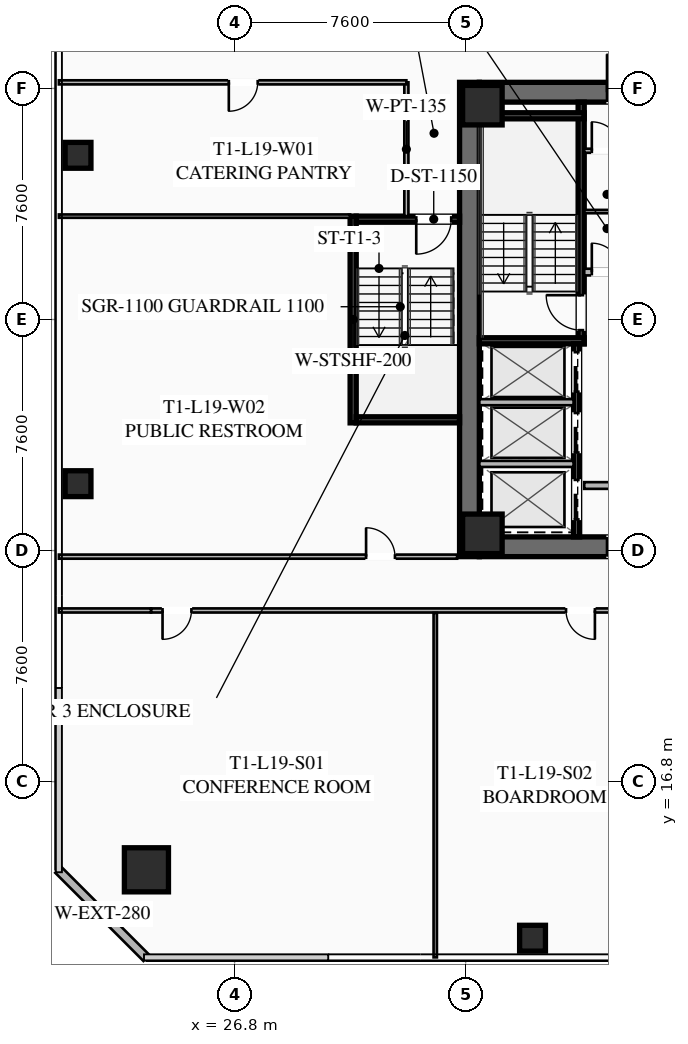
"""IFC4 building model, lengths in metres.
Left out: names, types, materials, properties, quantities, classifications, styles, units other than length and angle.
Written with IfcOpenShell. Run it as: python <this file> out.ifc"""

import sys

from ifc_helpers import new_model, si_unit, direction, frame, frame_2d, origin, origin_2d, place, context, subcontext, project, spatial, rectangle, hollow_rectangle, extrude, element, fill, save


model = new_model("IFC4")
c1 = context("Model", 3, precision=1e-05, world=origin(), true_north=direction((0.0, 1.0)))
c2 = subcontext(c1, "Body", "Model", "MODEL_VIEW")
j1 = project(units=[si_unit("LENGTHUNIT", "METRE"), si_unit("PLANEANGLEUNIT", "RADIAN")], contexts=[c1])
p1 = place(None, origin())
s1 = spatial("IfcSite", under=j1, at=p1, CompositionType="ELEMENT")
p2 = place(p1, origin())
s2 = spatial("IfcBuilding", under=s1, at=p2, CompositionType="ELEMENT")
p3 = place(p2, frame((0.0, 0.0, 74.3)))
s3 = spatial("IfcBuildingStorey", under=s2, at=p3, CompositionType="ELEMENT", Elevation=74.3)
p4 = place(p3, frame((34.525, 24.2, 0.0), z_axis=(0.0, 0.0, 1.0), x_axis=(0.0, 1.0, 0.0)))
e1 = element("IfcWall", 1, at=p4, inside=s3, PredefinedType="SHEAR", context=c2, shape_type="SweptSolid", body=[
    extrude(rectangle(XDim=15.6, YDim=0.65, at=frame_2d((7.8, 0.0))), origin(), (0.0, 0.0, 1.0), 3.55),
])
p5 = place(p3, frame((49.15, 24.525, 0.0), z_axis=(0.0, 0.0, 1.0), x_axis=(-1.0, 0.0, 0.0)))
e2 = element("IfcWall", 2, at=p5, inside=s3, PredefinedType="SHEAR", context=c2, shape_type="SweptSolid", body=[
    extrude(rectangle(XDim=14.3, YDim=0.65, at=frame_2d((7.15, 0.0))), origin(), (0.0, 0.0, 1.0), 3.55),
])
p6 = place(p5, frame((8.85, 0.0, 0.0)))
e3 = element("IfcOpeningElement", 3, at=p6, cuts=e2, PredefinedType="OPENING", context=c2, shape_type="SweptSolid", body=[
    extrude(rectangle(XDim=1.25, YDim=2.25, at=frame_2d((0.625, 1.125))), frame((0.0, 0.335, 0.0), z_axis=(0.0, -1.0, 0.0), x_axis=(1.0, 0.0, 0.0)), (0.0, 0.0, 1.0), 0.67),
])
p7 = place(p5, frame((3.8, 0.0, 0.0)))
e4 = element("IfcOpeningElement", 4, at=p7, cuts=e2, PredefinedType="OPENING", context=c2, shape_type="SweptSolid", body=[
    extrude(rectangle(XDim=1.25, YDim=2.25, at=frame_2d((0.625, 1.125))), frame((0.0, 0.335, 0.0), z_axis=(0.0, -1.0, 0.0), x_axis=(1.0, 0.0, 0.0)), (0.0, 0.0, 1.0), 0.67),
])
p8 = place(p3, frame((34.85, 39.475, 0.0), z_axis=(0.0, 0.0, 1.0), x_axis=(1.0, 0.0, 0.0)))
e5 = element("IfcWall", 5, at=p8, inside=s3, PredefinedType="SHEAR", context=c2, shape_type="SweptSolid", body=[
    extrude(rectangle(XDim=14.3, YDim=0.65, at=frame_2d((7.15, 0.0))), origin(), (0.0, 0.0, 1.0), 3.55),
])
p9 = place(p8, frame((4.2, 0.0, 0.0)))
e6 = element("IfcOpeningElement", 6, at=p9, cuts=e5, PredefinedType="OPENING", context=c2, shape_type="SweptSolid", body=[
    extrude(rectangle(XDim=1.25, YDim=2.25, at=frame_2d((0.625, 1.125))), frame((0.0, 0.335, 0.0), z_axis=(0.0, -1.0, 0.0), x_axis=(1.0, 0.0, 0.0)), (0.0, 0.0, 1.0), 0.67),
])
p10 = place(p8, frame((9.25, 0.0, 0.0)))
e7 = element("IfcOpeningElement", 7, at=p10, cuts=e5, PredefinedType="OPENING", context=c2, shape_type="SweptSolid", body=[
    extrude(rectangle(XDim=1.25, YDim=2.25, at=frame_2d((0.625, 1.125))), frame((0.0, 0.335, 0.0), z_axis=(0.0, -1.0, 0.0), x_axis=(1.0, 0.0, 0.0)), (0.0, 0.0, 1.0), 0.67),
])
for number, where, z_axis, x_axis in (
    (8, (34.95, 24.95, 0.0), (0.0, 0.0, 1.0), (1.0, 0.0, 0.0)),
    (9, (34.95, 39.05, 0.0), (0.0, 0.0, 1.0), (1.0, 0.0, 0.0)),
):
    element("IfcColumn", number, at=place(p3, frame(where, z_axis=z_axis, x_axis=x_axis)), inside=s3, PredefinedType="COLUMN", context=c2, shape_type="SweptSolid", body=[
        extrude(hollow_rectangle(XDim=1.3, YDim=1.3, WallThickness=0.05, at=origin_2d()), origin(), (0.0, 0.0, 1.0), 3.35),
    ])
p11 = place(p3, frame((23.9, 13.9, 0.0), z_axis=(0.0, 0.0, 1.0), x_axis=(1.0, 0.0, 0.0)))
e10 = element("IfcColumn", 10, at=p11, inside=s3, PredefinedType="COLUMN", context=c2, shape_type="SweptSolid", body=[
    extrude(hollow_rectangle(XDim=1.45, YDim=1.45, WallThickness=0.055, at=origin_2d()), origin(), (0.0, 0.0, 1.0), 3.35),
])
for number, where, z_axis, x_axis in (
    (11, (36.6, 11.65, 0.0), (0.0, 0.0, 1.0), (1.0, 0.0, 0.0)),
    (12, (21.65, 37.4, 0.0), (0.0, 0.0, 1.0), (1.0, 0.0, 0.0)),
    (13, (21.65, 26.6, 0.0), (0.0, 0.0, 1.0), (1.0, 0.0, 0.0)),
):
    element("IfcColumn", number, at=place(p3, frame(where, z_axis=z_axis, x_axis=x_axis)), inside=s3, PredefinedType="COLUMN", context=c2, shape_type="SweptSolid", body=[
        extrude(hollow_rectangle(XDim=0.85, YDim=0.85, WallThickness=0.035, at=origin_2d()), origin(), (0.0, 0.0, 1.0), 3.35),
    ])
p12 = place(p3, frame((23.9, 11.0, 0.0), z_axis=(0.0, 0.0, 1.0), x_axis=(-0.707106781187, 0.707106781187, 0.0)))
e14 = element("IfcWall", 14, at=p12, inside=s3, PredefinedType="SOLIDWALL", context=c2, shape_type="SweptSolid", body=[
    extrude(rectangle(XDim=4.101, YDim=0.28, at=frame_2d((2.051, 0.0))), origin(), (0.0, 0.0, 1.0), 3.35),
])
p13 = place(p3, frame((38.2, 31.2, 0.0), z_axis=(0.0, 0.0, 1.0), x_axis=(0.0, 1.0, 0.0)))
e15 = element("IfcWall", 15, at=p13, inside=s3, PredefinedType="SHEAR", context=c2, shape_type="SweptSolid", body=[
    extrude(rectangle(XDim=7.95, YDim=0.2, at=frame_2d((3.975, 0.0))), origin(), (0.0, 0.0, 1.0), 3.35),
])
p14 = place(p13, frame((0.45, 0.0, 0.0)))
e16 = element("IfcOpeningElement", 16, at=p14, cuts=e15, PredefinedType="OPENING", context=c2, shape_type="SweptSolid", body=[
    extrude(rectangle(XDim=1.15, YDim=2.2, at=frame_2d((0.575, 1.1))), frame((0.0, 0.11, 0.0), z_axis=(0.0, -1.0, 0.0), x_axis=(1.0, 0.0, 0.0)), (0.0, 0.0, 1.0), 0.22),
])
for number, where, z_axis, x_axis in (
    (17, (34.85, 31.3, 0.0), (0.0, 0.0, 1.0), (1.0, 0.0, 0.0)),
    (18, (34.85, 38.7, 0.0), (0.0, 0.0, 1.0), (1.0, 0.0, 0.0)),
):
    element("IfcWall", number, at=place(p3, frame(where, z_axis=z_axis, x_axis=x_axis)), inside=s3, PredefinedType="SHEAR", context=c2, shape_type="SweptSolid", body=[
        extrude(rectangle(XDim=3.45, YDim=0.2, at=frame_2d((1.725, 0.0))), origin(), (0.0, 0.0, 1.0), 3.35),
    ])
p15 = place(p3, frame((38.3, 33.56, 0.0), z_axis=(0.0, 0.0, 1.0), x_axis=(1.0, 0.0, 0.0)))
e19 = element("IfcWall", 19, at=p15, inside=s3, PredefinedType="SOLIDWALL", context=c2, shape_type="SweptSolid", body=[
    extrude(rectangle(XDim=3.15, YDim=0.22, at=frame_2d((1.575, 0.0))), origin(), (0.0, 0.0, 1.0), 2.703),
])
p16 = place(p15, frame((0.25, 0.0, 0.0)))
e20 = element("IfcOpeningElement", 20, at=p16, cuts=e19, PredefinedType="OPENING", context=c2, shape_type="SweptSolid", body=[
    extrude(rectangle(XDim=0.95, YDim=2.05, at=frame_2d((0.475, 1.025))), frame((0.0, 0.12, 0.0), z_axis=(0.0, -1.0, 0.0), x_axis=(1.0, 0.0, 0.0)), (0.0, 0.0, 1.0), 0.24),
])
p17 = place(p15, frame((1.95, 0.0, 0.0)))
e21 = element("IfcOpeningElement", 21, at=p17, cuts=e19, PredefinedType="OPENING", context=c2, shape_type="SweptSolid", body=[
    extrude(rectangle(XDim=0.95, YDim=2.05, at=frame_2d((0.475, 1.025))), frame((0.0, 0.12, 0.0), z_axis=(0.0, -1.0, 0.0), x_axis=(1.0, 0.0, 0.0)), (0.0, 0.0, 1.0), 0.24),
])
p18 = place(p3, frame((38.3, 26.54, 0.0), z_axis=(0.0, 0.0, 1.0), x_axis=(1.0, 0.0, 0.0)))
e22 = element("IfcWall", 22, at=p18, inside=s3, PredefinedType="SOLIDWALL", context=c2, shape_type="SweptSolid", body=[
    extrude(rectangle(XDim=3.15, YDim=0.22, at=frame_2d((1.575, 0.0))), origin(), (0.0, 0.0, 1.0), 2.703),
])
p19 = place(p18, frame((0.95, 0.0, 0.0)))
e23 = element("IfcOpeningElement", 23, at=p19, cuts=e22, PredefinedType="OPENING", context=c2, shape_type="SweptSolid", body=[
    extrude(rectangle(XDim=1.25, YDim=2.25, at=frame_2d((0.625, 1.125))), frame((0.0, 0.12, 0.0), z_axis=(0.0, -1.0, 0.0), x_axis=(1.0, 0.0, 0.0)), (0.0, 0.0, 1.0), 0.24),
])
p20 = place(p3, frame((38.05, 24.85, 0.0), z_axis=(0.0, 0.0, 1.0), x_axis=(0.0, 1.0, 0.0)))
e24 = element("IfcWall", 24, at=p20, inside=s3, PredefinedType="SHEAR", context=c2, shape_type="SweptSolid", body=[
    extrude(rectangle(XDim=6.35, YDim=0.2, at=frame_2d((3.175, 0.0))), origin(), (0.0, 0.0, 1.0), 3.35),
])
p21 = place(p20, frame((4.775, 0.0, 0.0)))
e25 = element("IfcOpeningElement", 25, at=p21, cuts=e24, PredefinedType="OPENING", context=c2, shape_type="SweptSolid", body=[
    extrude(rectangle(XDim=1.3, YDim=2.25, at=frame_2d((0.65, 1.125))), frame((0.0, 0.11, 0.0), z_axis=(0.0, -1.0, 0.0), x_axis=(1.0, 0.0, 0.0)), (0.0, 0.0, 1.0), 0.22),
])
p22 = place(p20, frame((2.775, 0.0, 0.0)))
e26 = element("IfcOpeningElement", 26, at=p22, cuts=e24, PredefinedType="OPENING", context=c2, shape_type="SweptSolid", body=[
    extrude(rectangle(XDim=1.3, YDim=2.25, at=frame_2d((0.65, 1.125))), frame((0.0, 0.11, 0.0), z_axis=(0.0, -1.0, 0.0), x_axis=(1.0, 0.0, 0.0)), (0.0, 0.0, 1.0), 0.22),
])
p23 = place(p20, frame((0.575, 0.0, 0.0)))
e27 = element("IfcOpeningElement", 27, at=p23, cuts=e24, PredefinedType="OPENING", context=c2, shape_type="SweptSolid", body=[
    extrude(rectangle(XDim=1.3, YDim=2.25, at=frame_2d((0.65, 1.125))), frame((0.0, 0.11, 0.0), z_axis=(0.0, -1.0, 0.0), x_axis=(1.0, 0.0, 0.0)), (0.0, 0.0, 1.0), 0.22),
])
for number, where, z_axis, x_axis in (
    (28, (34.85, 27.25, 0.0), (0.0, 0.0, 1.0), (1.0, 0.0, 0.0)),
    (29, (34.85, 29.28, 0.0), (0.0, 0.0, 1.0), (1.0, 0.0, 0.0)),
):
    element("IfcWall", number, at=place(p3, frame(where, z_axis=z_axis, x_axis=x_axis)), inside=s3, PredefinedType="SOLIDWALL", context=c2, shape_type="SweptSolid", body=[
        extrude(rectangle(XDim=3.1, YDim=0.2, at=frame_2d((1.55, 0.0))), origin(), (0.0, 0.0, 1.0), 3.35),
    ])
p24 = place(p3, frame((38.3, 37.55, 0.0), z_axis=(0.0, 0.0, 1.0), x_axis=(1.0, 0.0, 0.0)))
e30 = element("IfcWall", 30, at=p24, inside=s3, PredefinedType="PARTITIONING", context=c2, shape_type="SweptSolid", body=[
    extrude(rectangle(XDim=3.15, YDim=0.135, at=frame_2d((1.575, 0.0))), origin(), (0.0, 0.0, 1.0), 2.703),
])
p25 = place(p24, frame((0.25, 0.0, 0.0)))
e31 = element("IfcOpeningElement", 31, at=p25, cuts=e30, PredefinedType="OPENING", context=c2, shape_type="SweptSolid", body=[
    extrude(rectangle(XDim=0.95, YDim=2.05, at=frame_2d((0.475, 1.025))), frame((0.0, 0.077, 0.0), z_axis=(0.0, -1.0, 0.0), x_axis=(1.0, 0.0, 0.0)), (0.0, 0.0, 1.0), 0.155),
])
p26 = place(p24, frame((1.95, 0.0, 0.0)))
e32 = element("IfcOpeningElement", 32, at=p26, cuts=e30, PredefinedType="OPENING", context=c2, shape_type="SweptSolid", body=[
    extrude(rectangle(XDim=0.95, YDim=2.05, at=frame_2d((0.475, 1.025))), frame((0.0, 0.077, 0.0), z_axis=(0.0, -1.0, 0.0), x_axis=(1.0, 0.0, 0.0)), (0.0, 0.0, 1.0), 0.155),
])
p27 = place(p3, frame((38.3, 35.55, 0.0), z_axis=(0.0, 0.0, 1.0), x_axis=(1.0, 0.0, 0.0)))
e33 = element("IfcWall", 33, at=p27, inside=s3, PredefinedType="PARTITIONING", context=c2, shape_type="SweptSolid", body=[
    extrude(rectangle(XDim=3.15, YDim=0.11, at=frame_2d((1.575, 0.0))), origin(), (0.0, 0.0, 1.0), 2.703),
])
p28 = place(p3, frame((30.7, 28.6, 0.0), z_axis=(0.0, 0.0, 1.0), x_axis=(0.0, 1.0, 0.0)))
e34 = element("IfcWall", 34, at=p28, inside=s3, PredefinedType="SHEAR", context=c2, shape_type="SweptSolid", body=[
    extrude(rectangle(XDim=6.8, YDim=0.2, at=frame_2d((3.4, 0.0))), origin(), (0.0, 0.0, 1.0), 3.35),
])
p29 = place(p3, frame((34.2, 35.3, 0.0), z_axis=(0.0, 0.0, 1.0), x_axis=(-1.0, 0.0, 0.0)))
e35 = element("IfcWall", 35, at=p29, inside=s3, PredefinedType="SHEAR", context=c2, shape_type="SweptSolid", body=[
    extrude(rectangle(XDim=3.4, YDim=0.2, at=frame_2d((1.7, 0.0))), origin(), (0.0, 0.0, 1.0), 3.35),
])
p30 = place(p29, frame((0.275, 0.0, 0.0)))
e36 = element("IfcOpeningElement", 36, at=p30, cuts=e35, PredefinedType="OPENING", context=c2, shape_type="SweptSolid", body=[
    extrude(rectangle(XDim=1.15, YDim=2.2, at=frame_2d((0.575, 1.1))), frame((0.0, 0.11, 0.0), z_axis=(0.0, -1.0, 0.0), x_axis=(1.0, 0.0, 0.0)), (0.0, 0.0, 1.0), 0.22),
])
p31 = place(p3, frame((30.8, 28.7, 0.0), z_axis=(0.0, 0.0, 1.0), x_axis=(1.0, 0.0, 0.0)))
e37 = element("IfcWall", 37, at=p31, inside=s3, PredefinedType="SHEAR", context=c2, shape_type="SweptSolid", body=[
    extrude(rectangle(XDim=3.4, YDim=0.2, at=frame_2d((1.7, 0.0))), origin(), (0.0, 0.0, 1.0), 3.35),
])
p32 = place(p3, frame((32.45, 35.4, 0.0), z_axis=(0.0, 0.0, 1.0), x_axis=(0.0, 1.0, 0.0)))
e38 = element("IfcWall", 38, at=p32, inside=s3, PredefinedType="PARTITIONING", context=c2, shape_type="SweptSolid", body=[
    extrude(rectangle(XDim=4.4, YDim=0.135, at=frame_2d((2.2, 0.0))), origin(), (0.0, 0.0, 1.0), 2.703),
])
p33 = place(p3, frame((51.35, 22.43, 0.0), z_axis=(0.0, 0.0, 1.0), x_axis=(-1.0, 0.0, 0.0)))
e39 = element("IfcWall", 39, at=p33, inside=s3, PredefinedType="PARTITIONING", context=c2, shape_type="SweptSolid", body=[
    extrude(rectangle(XDim=27.3, YDim=0.135, at=frame_2d((13.65, 0.0))), origin(), (0.0, 0.0, 1.0), 2.703),
])
p34 = place(p33, frame((25.97, 0.0, 0.0)))
e40 = element("IfcOpeningElement", 40, at=p34, cuts=e39, PredefinedType="OPENING", context=c2, shape_type="SweptSolid", body=[
    extrude(rectangle(XDim=0.95, YDim=2.05, at=frame_2d((0.475, 1.025))), frame((0.0, 0.077, 0.0), z_axis=(0.0, -1.0, 0.0), x_axis=(1.0, 0.0, 0.0)), (0.0, 0.0, 1.0), 0.155),
])
p35 = place(p33, frame((12.698, 0.0, 0.0)))
e41 = element("IfcOpeningElement", 41, at=p35, cuts=e39, PredefinedType="OPENING", context=c2, shape_type="SweptSolid", body=[
    extrude(rectangle(XDim=0.95, YDim=2.05, at=frame_2d((0.475, 1.025))), frame((0.0, 0.077, 0.0), z_axis=(0.0, -1.0, 0.0), x_axis=(1.0, 0.0, 0.0)), (0.0, 0.0, 1.0), 0.155),
])
p36 = place(p33, frame((8.639, 0.0, 0.0)))
e42 = element("IfcOpeningElement", 42, at=p36, cuts=e39, PredefinedType="OPENING", context=c2, shape_type="SweptSolid", body=[
    extrude(rectangle(XDim=0.95, YDim=2.05, at=frame_2d((0.475, 1.025))), frame((0.0, 0.077, 0.0), z_axis=(0.0, -1.0, 0.0), x_axis=(1.0, 0.0, 0.0)), (0.0, 0.0, 1.0), 0.155),
])
p37 = place(p33, frame((0.38, 0.0, 0.0)))
e43 = element("IfcOpeningElement", 43, at=p37, cuts=e39, PredefinedType="OPENING", context=c2, shape_type="SweptSolid", body=[
    extrude(rectangle(XDim=0.95, YDim=2.05, at=frame_2d((0.475, 1.025))), frame((0.0, 0.077, 0.0), z_axis=(0.0, -1.0, 0.0), x_axis=(1.0, 0.0, 0.0)), (0.0, 0.0, 1.0), 0.155),
])
p38 = place(p3, frame((21.02, 22.43, 0.0), z_axis=(0.0, 0.0, 1.0), x_axis=(1.0, 0.0, 0.0)))
e44 = element("IfcWall", 44, at=p38, inside=s3, PredefinedType="PARTITIONING", context=c2, shape_type="SweptSolid", body=[
    extrude(rectangle(XDim=3.03, YDim=0.135, at=frame_2d((1.515, 0.0))), origin(), (0.0, 0.0, 1.0), 2.703),
])
p39 = place(p3, frame((33.4, 11.02, 0.0), z_axis=(0.0, 0.0, 1.0), x_axis=(0.0, 1.0, 0.0)))
e45 = element("IfcWall", 45, at=p39, inside=s3, PredefinedType="PARTITIONING", context=c2, shape_type="SweptSolid", body=[
    extrude(rectangle(XDim=11.33, YDim=0.11, at=frame_2d((5.665, 0.0))), origin(), (0.0, 0.0, 1.0), 2.703),
])
p40 = place(p3, frame((32.45, 39.8, 0.0), z_axis=(0.0, 0.0, 1.0), x_axis=(-1.0, 0.0, 0.0)))
e46 = element("IfcWall", 46, at=p40, inside=s3, PredefinedType="PARTITIONING", context=c2, shape_type="SweptSolid", body=[
    extrude(rectangle(XDim=11.43, YDim=0.135, at=frame_2d((5.715, 0.0))), origin(), (0.0, 0.0, 1.0), 2.703),
])
p41 = place(p40, frame((4.89, 0.0, 0.0)))
e47 = element("IfcOpeningElement", 47, at=p41, cuts=e46, PredefinedType="OPENING", context=c2, shape_type="SweptSolid", body=[
    extrude(rectangle(XDim=0.95, YDim=2.05, at=frame_2d((0.475, 1.025))), frame((0.0, 0.077, 0.0), z_axis=(0.0, -1.0, 0.0), x_axis=(1.0, 0.0, 0.0)), (0.0, 0.0, 1.0), 0.155),
])
p42 = place(p3, frame((21.02, 24.2, 0.0), z_axis=(0.0, 0.0, 1.0), x_axis=(1.0, 0.0, 0.0)))
e48 = element("IfcWall", 48, at=p42, inside=s3, PredefinedType="PARTITIONING", context=c2, shape_type="SweptSolid", body=[
    extrude(rectangle(XDim=13.1, YDim=0.135, at=frame_2d((6.55, 0.0))), origin(), (0.0, 0.0, 1.0), 2.703),
])
p43 = place(p42, frame((10.105, 0.0, 0.0)))
e49 = element("IfcOpeningElement", 49, at=p43, cuts=e48, PredefinedType="OPENING", context=c2, shape_type="SweptSolid", body=[
    extrude(rectangle(XDim=0.95, YDim=2.05, at=frame_2d((0.475, 1.025))), frame((0.0, 0.077, 0.0), z_axis=(0.0, -1.0, 0.0), x_axis=(1.0, 0.0, 0.0)), (0.0, 0.0, 1.0), 0.155),
])
p44 = place(p3, frame((30.6, 35.4, 0.0), z_axis=(0.0, 0.0, 1.0), x_axis=(-1.0, 0.0, 0.0)))
e50 = element("IfcWall", 50, at=p44, inside=s3, PredefinedType="PARTITIONING", context=c2, shape_type="SweptSolid", body=[
    extrude(rectangle(XDim=9.58, YDim=0.11, at=frame_2d((4.79, 0.0))), origin(), (0.0, 0.0, 1.0), 2.703),
])
p45 = place(p9, origin())
e51 = element("IfcDoor", 51, at=p45, inside=s3, OperationType="SINGLE_SWING_LEFT", PredefinedType="DOOR", context=c2, shape_type="SweptSolid", body=[
    extrude(rectangle(XDim=1.25, YDim=2.25, at=frame_2d((0.625, 1.125))), frame((0.0, 0.025, 0.0), z_axis=(0.0, -1.0, 0.0), x_axis=(1.0, 0.0, 0.0)), (0.0, 0.0, 1.0), 0.05),
])
fill(e6, e51)
p46 = place(p6, origin())
e52 = element("IfcDoor", 52, at=p46, inside=s3, OperationType="SINGLE_SWING_LEFT", PredefinedType="DOOR", context=c2, shape_type="SweptSolid", body=[
    extrude(rectangle(XDim=1.25, YDim=2.25, at=frame_2d((0.625, 1.125))), frame((0.0, 0.025, 0.0), z_axis=(0.0, -1.0, 0.0), x_axis=(1.0, 0.0, 0.0)), (0.0, 0.0, 1.0), 0.05),
])
fill(e3, e52)
p47 = place(p14, origin())
e53 = element("IfcDoor", 53, at=p47, inside=s3, OperationType="SINGLE_SWING_RIGHT", PredefinedType="DOOR", context=c2, shape_type="SweptSolid", body=[
    extrude(rectangle(XDim=1.15, YDim=2.2, at=frame_2d((0.575, 1.1))), frame((0.0, 0.025, 0.0), z_axis=(0.0, -1.0, 0.0), x_axis=(1.0, 0.0, 0.0)), (0.0, 0.0, 1.0), 0.05),
])
fill(e16, e53)
p48 = place(p25, origin())
e54 = element("IfcDoor", 54, at=p48, inside=s3, OperationType="SINGLE_SWING_LEFT", PredefinedType="DOOR", context=c2, shape_type="SweptSolid", body=[
    extrude(rectangle(XDim=0.95, YDim=2.05, at=frame_2d((0.475, 1.025))), frame((0.0, 0.025, 0.0), z_axis=(0.0, -1.0, 0.0), x_axis=(1.0, 0.0, 0.0)), (0.0, 0.0, 1.0), 0.05),
])
fill(e31, e54)
p49 = place(p16, origin())
e55 = element("IfcDoor", 55, at=p49, inside=s3, OperationType="SINGLE_SWING_LEFT", PredefinedType="DOOR", context=c2, shape_type="SweptSolid", body=[
    extrude(rectangle(XDim=0.95, YDim=2.05, at=frame_2d((0.475, 1.025))), frame((0.0, 0.025, 0.0), z_axis=(0.0, -1.0, 0.0), x_axis=(1.0, 0.0, 0.0)), (0.0, 0.0, 1.0), 0.05),
])
fill(e20, e55)
p50 = place(p30, origin())
e56 = element("IfcDoor", 56, at=p50, inside=s3, OperationType="SINGLE_SWING_RIGHT", PredefinedType="DOOR", context=c2, shape_type="SweptSolid", body=[
    extrude(rectangle(XDim=1.15, YDim=2.2, at=frame_2d((0.575, 1.1))), frame((0.0, 0.025, 0.0), z_axis=(0.0, -1.0, 0.0), x_axis=(1.0, 0.0, 0.0)), (0.0, 0.0, 1.0), 0.05),
])
fill(e36, e56)
p51 = place(p34, origin())
e57 = element("IfcDoor", 57, at=p51, inside=s3, OperationType="SINGLE_SWING_RIGHT", PredefinedType="DOOR", context=c2, shape_type="SweptSolid", body=[
    extrude(rectangle(XDim=0.95, YDim=2.05, at=frame_2d((0.475, 1.025))), frame((0.0, 0.025, 0.0), z_axis=(0.0, -1.0, 0.0), x_axis=(1.0, 0.0, 0.0)), (0.0, 0.0, 1.0), 0.05),
])
fill(e40, e57)
p52 = place(p35, origin())
e58 = element("IfcDoor", 58, at=p52, inside=s3, OperationType="SINGLE_SWING_LEFT", PredefinedType="DOOR", context=c2, shape_type="SweptSolid", body=[
    extrude(rectangle(XDim=0.95, YDim=2.05, at=frame_2d((0.475, 1.025))), frame((0.0, 0.025, 0.0), z_axis=(0.0, -1.0, 0.0), x_axis=(1.0, 0.0, 0.0)), (0.0, 0.0, 1.0), 0.05),
])
fill(e41, e58)
p53 = place(p41, origin())
e59 = element("IfcDoor", 59, at=p53, inside=s3, OperationType="SINGLE_SWING_RIGHT", PredefinedType="DOOR", context=c2, shape_type="SweptSolid", body=[
    extrude(rectangle(XDim=0.95, YDim=2.05, at=frame_2d((0.475, 1.025))), frame((0.0, 0.025, 0.0), z_axis=(0.0, -1.0, 0.0), x_axis=(1.0, 0.0, 0.0)), (0.0, 0.0, 1.0), 0.05),
])
fill(e47, e59)
p54 = place(p43, origin())
e60 = element("IfcDoor", 60, at=p54, inside=s3, OperationType="SINGLE_SWING_LEFT", PredefinedType="DOOR", context=c2, shape_type="SweptSolid", body=[
    extrude(rectangle(XDim=0.95, YDim=2.05, at=frame_2d((0.475, 1.025))), frame((0.0, 0.025, 0.0), z_axis=(0.0, -1.0, 0.0), x_axis=(1.0, 0.0, 0.0)), (0.0, 0.0, 1.0), 0.05),
])
fill(e49, e60)
p55 = place(p21, origin())
e61 = element("IfcDoor", 61, at=p55, inside=s3, OperationType="SLIDING_TO_LEFT", PredefinedType="DOOR", context=c2, shape_type="SweptSolid", body=[
    extrude(rectangle(XDim=1.3, YDim=2.25, at=frame_2d((0.65, 1.125))), frame((0.0, 0.025, 0.0), z_axis=(0.0, -1.0, 0.0), x_axis=(1.0, 0.0, 0.0)), (0.0, 0.0, 1.0), 0.05),
])
fill(e25, e61)
p56 = place(p22, origin())
e62 = element("IfcDoor", 62, at=p56, inside=s3, OperationType="SLIDING_TO_LEFT", PredefinedType="DOOR", context=c2, shape_type="SweptSolid", body=[
    extrude(rectangle(XDim=1.3, YDim=2.25, at=frame_2d((0.65, 1.125))), frame((0.0, 0.025, 0.0), z_axis=(0.0, -1.0, 0.0), x_axis=(1.0, 0.0, 0.0)), (0.0, 0.0, 1.0), 0.05),
])
fill(e26, e62)
p57 = place(p23, origin())
e63 = element("IfcDoor", 63, at=p57, inside=s3, OperationType="SLIDING_TO_LEFT", PredefinedType="DOOR", context=c2, shape_type="SweptSolid", body=[
    extrude(rectangle(XDim=1.3, YDim=2.25, at=frame_2d((0.65, 1.125))), frame((0.0, 0.025, 0.0), z_axis=(0.0, -1.0, 0.0), x_axis=(1.0, 0.0, 0.0)), (0.0, 0.0, 1.0), 0.05),
])
fill(e27, e63)
save(model, sys.argv[1])
